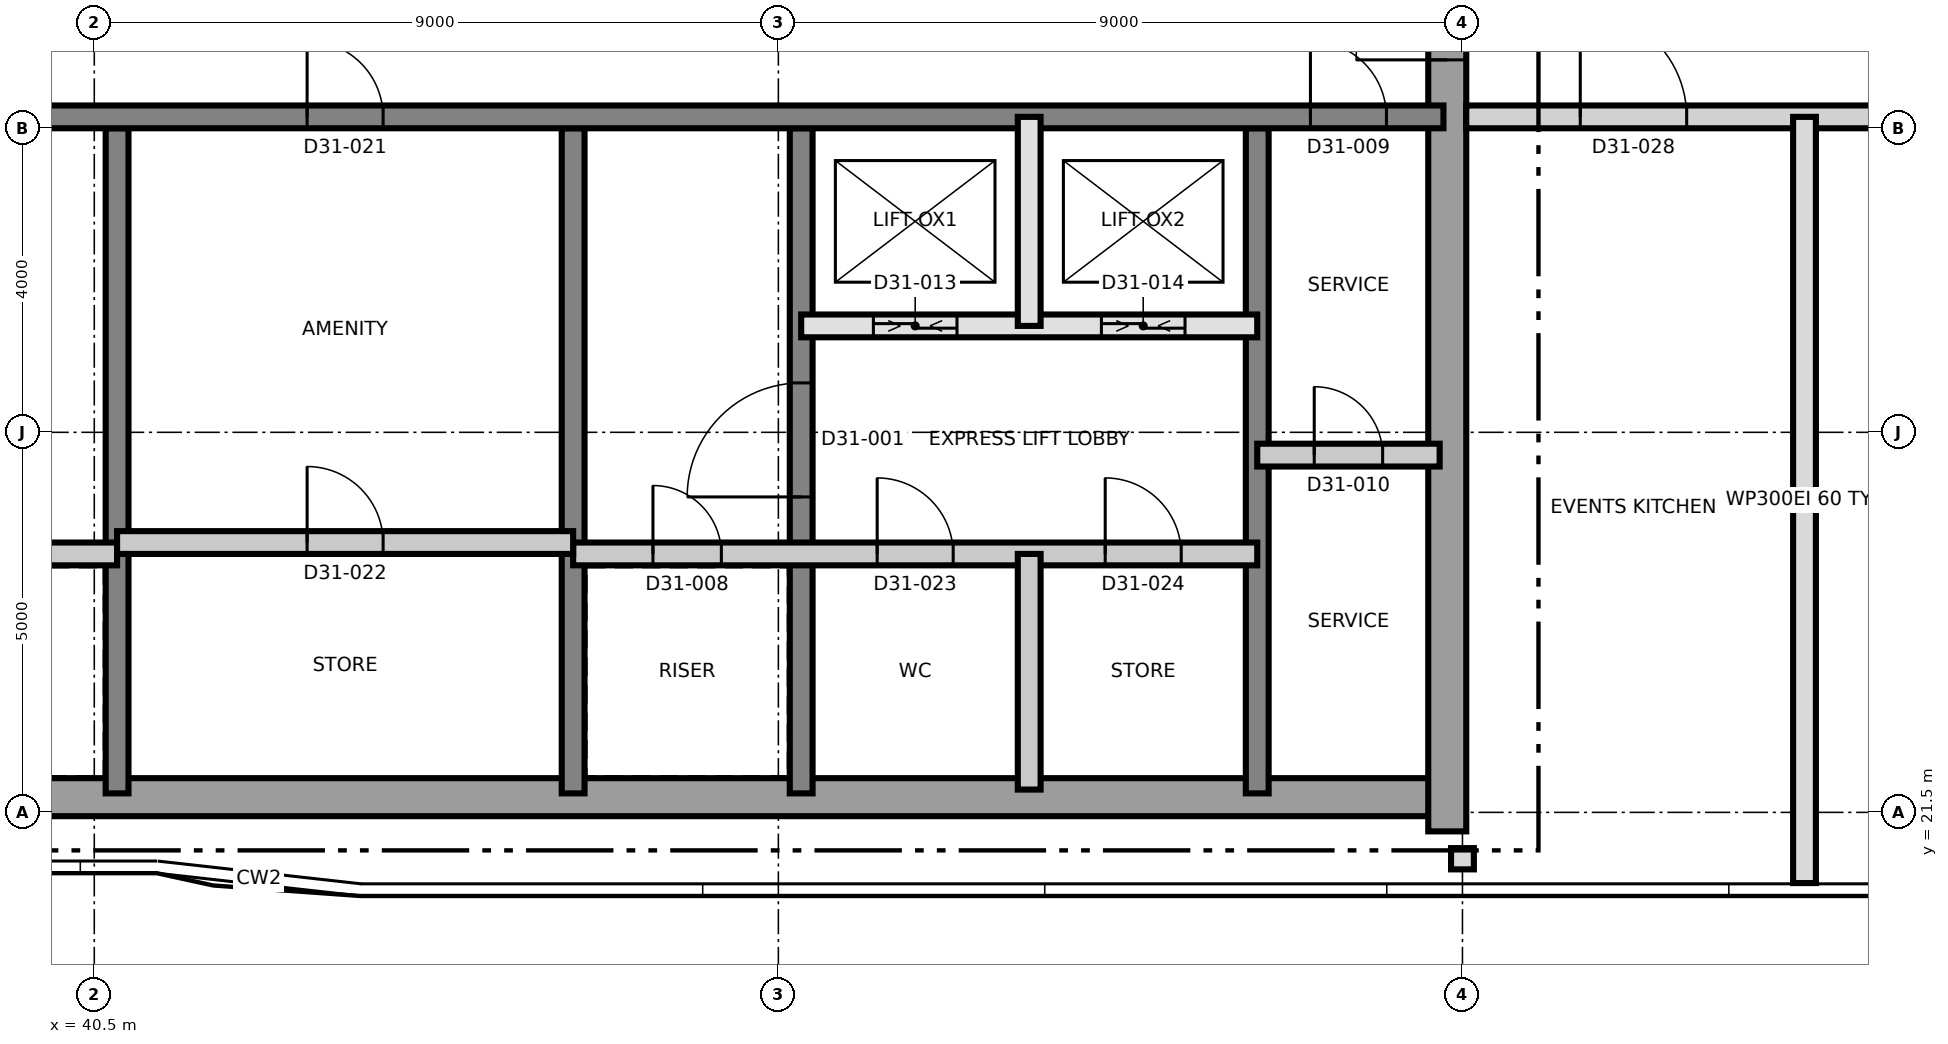
"""IFC4 building model, lengths in metres.
Left out: names, types, materials, properties, quantities, classifications, styles, units other than length and angle.
Written with IfcOpenShell. Run it as: python <this file> out.ifc"""

import sys

from ifc_helpers import new_model, si_unit, direction, frame, frame_2d, origin, place, context, subcontext, project, spatial, rectangle, extrude, element, fill, save


model = new_model("IFC4")
c1 = context("Model", 3, precision=1e-05, world=origin(), true_north=direction((0.0, 1.0)))
c2 = subcontext(c1, "Body", "Model", "MODEL_VIEW")
j1 = project(units=[si_unit("LENGTHUNIT", "METRE"), si_unit("PLANEANGLEUNIT", "RADIAN")], contexts=[c1])
p1 = place(None, origin())
s1 = spatial("IfcSite", under=j1, at=p1, CompositionType="ELEMENT")
p2 = place(p1, origin())
s2 = spatial("IfcBuilding", under=s1, at=p2, CompositionType="ELEMENT")
p3 = place(p2, frame((0.0, 0.0, 266.9)))
s3 = spatial("IfcBuildingStorey", under=s2, at=p3, CompositionType="ELEMENT", Elevation=266.9)
p4 = place(p3, frame((31.25, 21.7, 0.0), z_axis=(0.0, 0.0, 1.0), x_axis=(1.0, 0.0, 0.0)))
e1 = element("IfcWall", 1, at=p4, inside=s3, PredefinedType="SHEAR", context=c2, shape_type="SweptSolid", body=[
    extrude(rectangle(XDim=27.0, YDim=0.5, at=frame_2d((13.5, 0.0))), origin(), (0.0, 0.0, 1.0), 6.0),
])
p5 = place(p3, frame((58.3, 21.25, 0.0), z_axis=(0.0, 0.0, 1.0), x_axis=(0.0, 1.0, 0.0)))
e2 = element("IfcWall", 2, at=p5, inside=s3, PredefinedType="SHEAR", context=c2, shape_type="SweptSolid", body=[
    extrude(rectangle(XDim=18.5, YDim=0.5, at=frame_2d((9.25, 0.0))), origin(), (0.0, 0.0, 1.0), 6.0),
])
p6 = place(p5, frame((10.15, 0.0, 0.0)))
e3 = element("IfcOpeningElement", 3, at=p6, cuts=e2, PredefinedType="OPENING", context=c2, shape_type="SweptSolid", body=[
    extrude(rectangle(XDim=1.2, YDim=2.1, at=frame_2d((0.6, 1.05))), frame((0.0, 0.26, 0.0), z_axis=(0.0, -1.0, 0.0), x_axis=(1.0, 0.0, 0.0)), (0.0, 0.0, 1.0), 0.52),
])
for number, where, z_axis, x_axis in (
    (4, (40.8, 21.75, 0.0), (0.0, 0.0, 1.0), (0.0, 1.0, 0.0)),
    (5, (46.8, 21.75, 0.0), (0.0, 0.0, 1.0), (0.0, 1.0, 0.0)),
):
    element("IfcWall", number, at=place(p3, frame(where, z_axis=z_axis, x_axis=x_axis)), inside=s3, PredefinedType="SHEAR", context=c2, shape_type="SweptSolid", body=[
        extrude(rectangle(XDim=8.75, YDim=0.3, at=frame_2d((4.375, 0.0))), origin(), (0.0, 0.0, 1.0), 6.0),
    ])
p7 = place(p3, frame((49.8, 21.75, 0.0), z_axis=(0.0, 0.0, 1.0), x_axis=(0.0, 1.0, 0.0)))
e6 = element("IfcWall", 6, at=p7, inside=s3, PredefinedType="SHEAR", context=c2, shape_type="SweptSolid", body=[
    extrude(rectangle(XDim=8.75, YDim=0.3, at=frame_2d((4.375, 0.0))), origin(), (0.0, 0.0, 1.0), 6.0),
])
p8 = place(p7, frame((3.9, 0.0, 0.0)))
e7 = element("IfcOpeningElement", 7, at=p8, cuts=e6, PredefinedType="OPENING", context=c2, shape_type="SweptSolid", body=[
    extrude(rectangle(XDim=1.5, YDim=2.1, at=frame_2d((0.75, 1.05))), frame((0.0, 0.16, 0.0), z_axis=(0.0, -1.0, 0.0), x_axis=(1.0, 0.0, 0.0)), (0.0, 0.0, 1.0), 0.32),
])
p9 = place(p3, frame((55.8, 21.75, 0.0), z_axis=(0.0, 0.0, 1.0), x_axis=(0.0, 1.0, 0.0)))
e8 = element("IfcWall", 8, at=p9, inside=s3, PredefinedType="SHEAR", context=c2, shape_type="SweptSolid", body=[
    extrude(rectangle(XDim=8.75, YDim=0.3, at=frame_2d((4.375, 0.0))), origin(), (0.0, 0.0, 1.0), 6.0),
])
p10 = place(p3, frame((31.75, 30.65, 0.0), z_axis=(0.0, 0.0, 1.0), x_axis=(1.0, 0.0, 0.0)))
e9 = element("IfcWall", 9, at=p10, inside=s3, PredefinedType="SHEAR", context=c2, shape_type="SweptSolid", body=[
    extrude(rectangle(XDim=26.5, YDim=0.3, at=frame_2d((13.25, 0.0))), origin(), (0.0, 0.0, 1.0), 6.0),
])
p11 = place(p10, frame((24.75, 0.0, 0.0)))
e10 = element("IfcOpeningElement", 10, at=p11, cuts=e9, PredefinedType="OPENING", context=c2, shape_type="SweptSolid", body=[
    extrude(rectangle(XDim=1.0, YDim=2.1, at=frame_2d((0.5, 1.05))), frame((0.0, 0.16, 0.0), z_axis=(0.0, -1.0, 0.0), x_axis=(1.0, 0.0, 0.0)), (0.0, 0.0, 1.0), 0.32),
])
p12 = place(p10, frame((4.05, 0.0, 0.0)))
e11 = element("IfcOpeningElement", 11, at=p12, cuts=e9, PredefinedType="OPENING", context=c2, shape_type="SweptSolid", body=[
    extrude(rectangle(XDim=1.0, YDim=2.1, at=frame_2d((0.5, 1.05))), frame((0.0, 0.16, 0.0), z_axis=(0.0, -1.0, 0.0), x_axis=(1.0, 0.0, 0.0)), (0.0, 0.0, 1.0), 0.32),
])
p13 = place(p10, frame((11.55, 0.0, 0.0)))
e12 = element("IfcOpeningElement", 12, at=p13, cuts=e9, PredefinedType="OPENING", context=c2, shape_type="SweptSolid", body=[
    extrude(rectangle(XDim=1.0, YDim=2.1, at=frame_2d((0.5, 1.05))), frame((0.0, 0.16, 0.0), z_axis=(0.0, -1.0, 0.0), x_axis=(1.0, 0.0, 0.0)), (0.0, 0.0, 1.0), 0.32),
])
p14 = place(p3, frame((37.8, 24.9, 0.0), z_axis=(0.0, 0.0, 1.0), x_axis=(1.0, 0.0, 0.0)))
e13 = element("IfcWall", 13, at=p14, inside=s3, PredefinedType="PARTITIONING", context=c2, shape_type="SweptSolid", body=[
    extrude(rectangle(XDim=3.0, YDim=0.3, at=frame_2d((1.5, 0.0))), origin(), (0.0, 0.0, 1.0), 5.7),
])
p15 = place(p14, frame((1.05, 0.0, 0.0)))
e14 = element("IfcOpeningElement", 14, at=p15, cuts=e13, PredefinedType="OPENING", context=c2, shape_type="SweptSolid", body=[
    extrude(rectangle(XDim=0.9, YDim=2.1, at=frame_2d((0.45, 1.05))), frame((0.0, 0.16, 0.0), z_axis=(0.0, -1.0, 0.0), x_axis=(1.0, 0.0, 0.0)), (0.0, 0.0, 1.0), 0.32),
])
p16 = place(p3, frame((46.8, 24.9, 0.0), z_axis=(0.0, 0.0, 1.0), x_axis=(1.0, 0.0, 0.0)))
e15 = element("IfcWall", 15, at=p16, inside=s3, PredefinedType="PARTITIONING", context=c2, shape_type="SweptSolid", body=[
    extrude(rectangle(XDim=9.0, YDim=0.3, at=frame_2d((4.5, 0.0))), origin(), (0.0, 0.0, 1.0), 5.7),
])
p17 = place(p16, frame((1.05, 0.0, 0.0)))
e16 = element("IfcOpeningElement", 16, at=p17, cuts=e15, PredefinedType="OPENING", context=c2, shape_type="SweptSolid", body=[
    extrude(rectangle(XDim=0.9, YDim=2.1, at=frame_2d((0.45, 1.05))), frame((0.0, 0.16, 0.0), z_axis=(0.0, -1.0, 0.0), x_axis=(1.0, 0.0, 0.0)), (0.0, 0.0, 1.0), 0.32),
])
p18 = place(p16, frame((4.0, 0.0, 0.0)))
e17 = element("IfcOpeningElement", 17, at=p18, cuts=e15, PredefinedType="OPENING", context=c2, shape_type="SweptSolid", body=[
    extrude(rectangle(XDim=1.0, YDim=2.1, at=frame_2d((0.5, 1.05))), frame((0.0, 0.16, 0.0), z_axis=(0.0, -1.0, 0.0), x_axis=(1.0, 0.0, 0.0)), (0.0, 0.0, 1.0), 0.32),
])
p19 = place(p16, frame((7.0, 0.0, 0.0)))
e18 = element("IfcOpeningElement", 18, at=p19, cuts=e15, PredefinedType="OPENING", context=c2, shape_type="SweptSolid", body=[
    extrude(rectangle(XDim=1.0, YDim=2.1, at=frame_2d((0.5, 1.05))), frame((0.0, 0.16, 0.0), z_axis=(0.0, -1.0, 0.0), x_axis=(1.0, 0.0, 0.0)), (0.0, 0.0, 1.0), 0.32),
])
p20 = place(p3, frame((40.8, 25.05, 0.0), z_axis=(0.0, 0.0, 1.0), x_axis=(1.0, 0.0, 0.0)))
e19 = element("IfcWall", 19, at=p20, inside=s3, PredefinedType="PARTITIONING", context=c2, shape_type="SweptSolid", body=[
    extrude(rectangle(XDim=6.0, YDim=0.3, at=frame_2d((3.0, 0.0))), origin(), (0.0, 0.0, 1.0), 5.7),
])
p21 = place(p20, frame((2.5, 0.0, 0.0)))
e20 = element("IfcOpeningElement", 20, at=p21, cuts=e19, PredefinedType="OPENING", context=c2, shape_type="SweptSolid", body=[
    extrude(rectangle(XDim=1.0, YDim=2.1, at=frame_2d((0.5, 1.05))), frame((0.0, 0.16, 0.0), z_axis=(0.0, -1.0, 0.0), x_axis=(1.0, 0.0, 0.0)), (0.0, 0.0, 1.0), 0.32),
])
p22 = place(p3, frame((55.8, 26.2, 0.0), z_axis=(0.0, 0.0, 1.0), x_axis=(1.0, 0.0, 0.0)))
e21 = element("IfcWall", 21, at=p22, inside=s3, PredefinedType="PARTITIONING", context=c2, shape_type="SweptSolid", body=[
    extrude(rectangle(XDim=2.4, YDim=0.3, at=frame_2d((1.2, 0.0))), origin(), (0.0, 0.0, 1.0), 5.7),
])
p23 = place(p22, frame((0.75, 0.0, 0.0)))
e22 = element("IfcOpeningElement", 22, at=p23, cuts=e21, PredefinedType="OPENING", context=c2, shape_type="SweptSolid", body=[
    extrude(rectangle(XDim=0.9, YDim=2.1, at=frame_2d((0.45, 1.05))), frame((0.0, 0.16, 0.0), z_axis=(0.0, -1.0, 0.0), x_axis=(1.0, 0.0, 0.0)), (0.0, 0.0, 1.0), 0.32),
])
p24 = place(p3, frame((49.8, 27.9, 0.0), z_axis=(0.0, 0.0, 1.0), x_axis=(1.0, 0.0, 0.0)))
e23 = element("IfcWall", 23, at=p24, inside=s3, PredefinedType="SOLIDWALL", context=c2, shape_type="SweptSolid", body=[
    extrude(rectangle(XDim=6.0, YDim=0.3, at=frame_2d((3.0, 0.0))), origin(), (0.0, 0.0, 1.0), 5.7),
])
p25 = place(p24, frame((0.95, 0.0, 0.0)))
e24 = element("IfcOpeningElement", 24, at=p25, cuts=e23, PredefinedType="OPENING", context=c2, shape_type="SweptSolid", body=[
    extrude(rectangle(XDim=1.1, YDim=2.4, at=frame_2d((0.55, 1.2))), frame((0.0, 0.16, 0.0), z_axis=(0.0, -1.0, 0.0), x_axis=(1.0, 0.0, 0.0)), (0.0, 0.0, 1.0), 0.32),
])
p26 = place(p24, frame((3.95, 0.0, 0.0)))
e25 = element("IfcOpeningElement", 25, at=p26, cuts=e23, PredefinedType="OPENING", context=c2, shape_type="SweptSolid", body=[
    extrude(rectangle(XDim=1.1, YDim=2.4, at=frame_2d((0.55, 1.2))), frame((0.0, 0.16, 0.0), z_axis=(0.0, -1.0, 0.0), x_axis=(1.0, 0.0, 0.0)), (0.0, 0.0, 1.0), 0.32),
])
p27 = place(p3, frame((52.8, 21.8, 0.0), z_axis=(0.0, 0.0, 1.0), x_axis=(0.0, 1.0, 0.0)))
e26 = element("IfcWall", 26, at=p27, inside=s3, PredefinedType="PARTITIONING", context=c2, shape_type="SweptSolid", body=[
    extrude(rectangle(XDim=3.1, YDim=0.3, at=frame_2d((1.55, 0.0))), origin(), (0.0, 0.0, 1.0), 5.7),
])
p28 = place(p3, frame((52.8, 27.9, 0.0), z_axis=(0.0, 0.0, 1.0), x_axis=(0.0, 1.0, 0.0)))
e27 = element("IfcWall", 27, at=p28, inside=s3, PredefinedType="SOLIDWALL", context=c2, shape_type="SweptSolid", body=[
    extrude(rectangle(XDim=2.75, YDim=0.3, at=frame_2d((1.375, 0.0))), origin(), (0.0, 0.0, 1.0), 5.7),
])
p29 = place(p3, frame((58.55, 30.65, 0.0), z_axis=(0.0, 0.0, 1.0), x_axis=(1.0, 0.0, 0.0)))
e28 = element("IfcWall", 28, at=p29, inside=s3, PredefinedType="PARTITIONING", context=c2, shape_type="SweptSolid", body=[
    extrude(rectangle(XDim=26.78, YDim=0.3, at=frame_2d((13.39, 0.0))), origin(), (0.0, 0.0, 1.0), 5.7),
])
p30 = place(p29, frame((1.5, 0.0, 0.0)))
e29 = element("IfcOpeningElement", 29, at=p30, cuts=e28, PredefinedType="OPENING", context=c2, shape_type="SweptSolid", body=[
    extrude(rectangle(XDim=1.4, YDim=2.1, at=frame_2d((0.7, 1.05))), frame((0.0, 0.16, 0.0), z_axis=(0.0, -1.0, 0.0), x_axis=(1.0, 0.0, 0.0)), (0.0, 0.0, 1.0), 0.32),
])
p31 = place(p29, frame((10.5, 0.0, 0.0)))
e30 = element("IfcOpeningElement", 30, at=p31, cuts=e28, PredefinedType="OPENING", context=c2, shape_type="SweptSolid", body=[
    extrude(rectangle(XDim=1.4, YDim=2.1, at=frame_2d((0.7, 1.05))), frame((0.0, 0.16, 0.0), z_axis=(0.0, -1.0, 0.0), x_axis=(1.0, 0.0, 0.0)), (0.0, 0.0, 1.0), 0.32),
])
p32 = place(p29, frame((21.85, 0.0, 0.0)))
e31 = element("IfcOpeningElement", 31, at=p32, cuts=e28, PredefinedType="OPENING", context=c2, shape_type="SweptSolid", body=[
    extrude(rectangle(XDim=1.2, YDim=2.1, at=frame_2d((0.6, 1.05))), frame((0.0, 0.16, 0.0), z_axis=(0.0, -1.0, 0.0), x_axis=(1.0, 0.0, 0.0)), (0.0, 0.0, 1.0), 0.32),
])
p33 = place(p3, frame((58.5, 20.75, 0.0), z_axis=(0.0, 0.0, 1.0), x_axis=(0.0, 1.0, 0.0)))
e32 = element("IfcWall", 32, at=p33, inside=s3, PredefinedType="PARTITIONING", context=c2, shape_type="SweptSolid", body=[
    extrude(rectangle(XDim=0.28, YDim=0.3, at=frame_2d((0.14, 0.0))), origin(), (0.0, 0.0, 1.0), 5.7),
])
p34 = place(p3, frame((63.0, 20.57, 0.0), z_axis=(0.0, 0.0, 1.0), x_axis=(0.0, 1.0, 0.0)))
e33 = element("IfcWall", 33, at=p34, inside=s3, PredefinedType="PARTITIONING", context=c2, shape_type="SweptSolid", body=[
    extrude(rectangle(XDim=10.08, YDim=0.3, at=frame_2d((5.04, 0.0))), origin(), (0.0, 0.0, 1.0), 5.7),
])
p35 = place(p8, origin())
e34 = element("IfcDoor", 34, at=p35, inside=s3, OperationType="SINGLE_SWING_LEFT", PredefinedType="DOOR", context=c2, shape_type="SweptSolid", body=[
    extrude(rectangle(XDim=1.5, YDim=2.1, at=frame_2d((0.75, 1.05))), frame((0.0, 0.025, 0.0), z_axis=(0.0, -1.0, 0.0), x_axis=(1.0, 0.0, 0.0)), (0.0, 0.0, 1.0), 0.05),
])
fill(e7, e34)
p36 = place(p17, origin())
e35 = element("IfcDoor", 35, at=p36, inside=s3, OperationType="SINGLE_SWING_RIGHT", PredefinedType="DOOR", context=c2, shape_type="SweptSolid", body=[
    extrude(rectangle(XDim=0.9, YDim=2.1, at=frame_2d((0.45, 1.05))), frame((0.0, 0.025, 0.0), z_axis=(0.0, -1.0, 0.0), x_axis=(1.0, 0.0, 0.0)), (0.0, 0.0, 1.0), 0.05),
])
fill(e16, e35)
p37 = place(p11, origin())
e36 = element("IfcDoor", 36, at=p37, inside=s3, OperationType="SINGLE_SWING_LEFT", PredefinedType="DOOR", context=c2, shape_type="SweptSolid", body=[
    extrude(rectangle(XDim=1.0, YDim=2.1, at=frame_2d((0.5, 1.05))), frame((0.0, 0.025, 0.0), z_axis=(0.0, -1.0, 0.0), x_axis=(1.0, 0.0, 0.0)), (0.0, 0.0, 1.0), 0.05),
])
fill(e10, e36)
p38 = place(p23, origin())
e37 = element("IfcDoor", 37, at=p38, inside=s3, OperationType="SINGLE_SWING_RIGHT", PredefinedType="DOOR", context=c2, shape_type="SweptSolid", body=[
    extrude(rectangle(XDim=0.9, YDim=2.1, at=frame_2d((0.45, 1.05))), frame((0.0, 0.025, 0.0), z_axis=(0.0, -1.0, 0.0), x_axis=(1.0, 0.0, 0.0)), (0.0, 0.0, 1.0), 0.05),
])
fill(e22, e37)
p39 = place(p6, origin())
e38 = element("IfcDoor", 38, at=p39, inside=s3, OperationType="SINGLE_SWING_LEFT", PredefinedType="DOOR", context=c2, shape_type="SweptSolid", body=[
    extrude(rectangle(XDim=1.2, YDim=2.1, at=frame_2d((0.6, 1.05))), frame((0.0, 0.025, 0.0), z_axis=(0.0, -1.0, 0.0), x_axis=(1.0, 0.0, 0.0)), (0.0, 0.0, 1.0), 0.05),
])
fill(e3, e38)
p40 = place(p25, origin())
e39 = element("IfcDoor", 39, at=p40, inside=s3, OperationType="SLIDING_TO_LEFT", PredefinedType="DOOR", context=c2, shape_type="SweptSolid", body=[
    extrude(rectangle(XDim=1.1, YDim=2.4, at=frame_2d((0.55, 1.2))), frame((0.0, 0.025, 0.0), z_axis=(0.0, -1.0, 0.0), x_axis=(1.0, 0.0, 0.0)), (0.0, 0.0, 1.0), 0.05),
])
fill(e24, e39)
p41 = place(p26, origin())
e40 = element("IfcDoor", 40, at=p41, inside=s3, OperationType="SLIDING_TO_LEFT", PredefinedType="DOOR", context=c2, shape_type="SweptSolid", body=[
    extrude(rectangle(XDim=1.1, YDim=2.4, at=frame_2d((0.55, 1.2))), frame((0.0, 0.025, 0.0), z_axis=(0.0, -1.0, 0.0), x_axis=(1.0, 0.0, 0.0)), (0.0, 0.0, 1.0), 0.05),
])
fill(e25, e40)
p42 = place(p13, origin())
e41 = element("IfcDoor", 41, at=p42, inside=s3, OperationType="SINGLE_SWING_LEFT", PredefinedType="DOOR", context=c2, shape_type="SweptSolid", body=[
    extrude(rectangle(XDim=1.0, YDim=2.1, at=frame_2d((0.5, 1.05))), frame((0.0, 0.025, 0.0), z_axis=(0.0, -1.0, 0.0), x_axis=(1.0, 0.0, 0.0)), (0.0, 0.0, 1.0), 0.05),
])
fill(e12, e41)
p43 = place(p21, origin())
e42 = element("IfcDoor", 42, at=p43, inside=s3, OperationType="SINGLE_SWING_RIGHT", PredefinedType="DOOR", context=c2, shape_type="SweptSolid", body=[
    extrude(rectangle(XDim=1.0, YDim=2.1, at=frame_2d((0.5, 1.05))), frame((0.0, 0.025, 0.0), z_axis=(0.0, -1.0, 0.0), x_axis=(1.0, 0.0, 0.0)), (0.0, 0.0, 1.0), 0.05),
])
fill(e20, e42)
p44 = place(p18, origin())
e43 = element("IfcDoor", 43, at=p44, inside=s3, OperationType="SINGLE_SWING_LEFT", PredefinedType="DOOR", context=c2, shape_type="SweptSolid", body=[
    extrude(rectangle(XDim=1.0, YDim=2.1, at=frame_2d((0.5, 1.05))), frame((0.0, 0.025, 0.0), z_axis=(0.0, -1.0, 0.0), x_axis=(1.0, 0.0, 0.0)), (0.0, 0.0, 1.0), 0.05),
])
fill(e17, e43)
p45 = place(p19, origin())
e44 = element("IfcDoor", 44, at=p45, inside=s3, OperationType="SINGLE_SWING_RIGHT", PredefinedType="DOOR", context=c2, shape_type="SweptSolid", body=[
    extrude(rectangle(XDim=1.0, YDim=2.1, at=frame_2d((0.5, 1.05))), frame((0.0, 0.025, 0.0), z_axis=(0.0, -1.0, 0.0), x_axis=(1.0, 0.0, 0.0)), (0.0, 0.0, 1.0), 0.05),
])
fill(e18, e44)
p46 = place(p30, origin())
e45 = element("IfcDoor", 45, at=p46, inside=s3, OperationType="SINGLE_SWING_LEFT", PredefinedType="DOOR", context=c2, shape_type="SweptSolid", body=[
    extrude(rectangle(XDim=1.4, YDim=2.1, at=frame_2d((0.7, 1.05))), frame((0.0, 0.025, 0.0), z_axis=(0.0, -1.0, 0.0), x_axis=(1.0, 0.0, 0.0)), (0.0, 0.0, 1.0), 0.05),
])
fill(e29, e45)
save(model, sys.argv[1])
